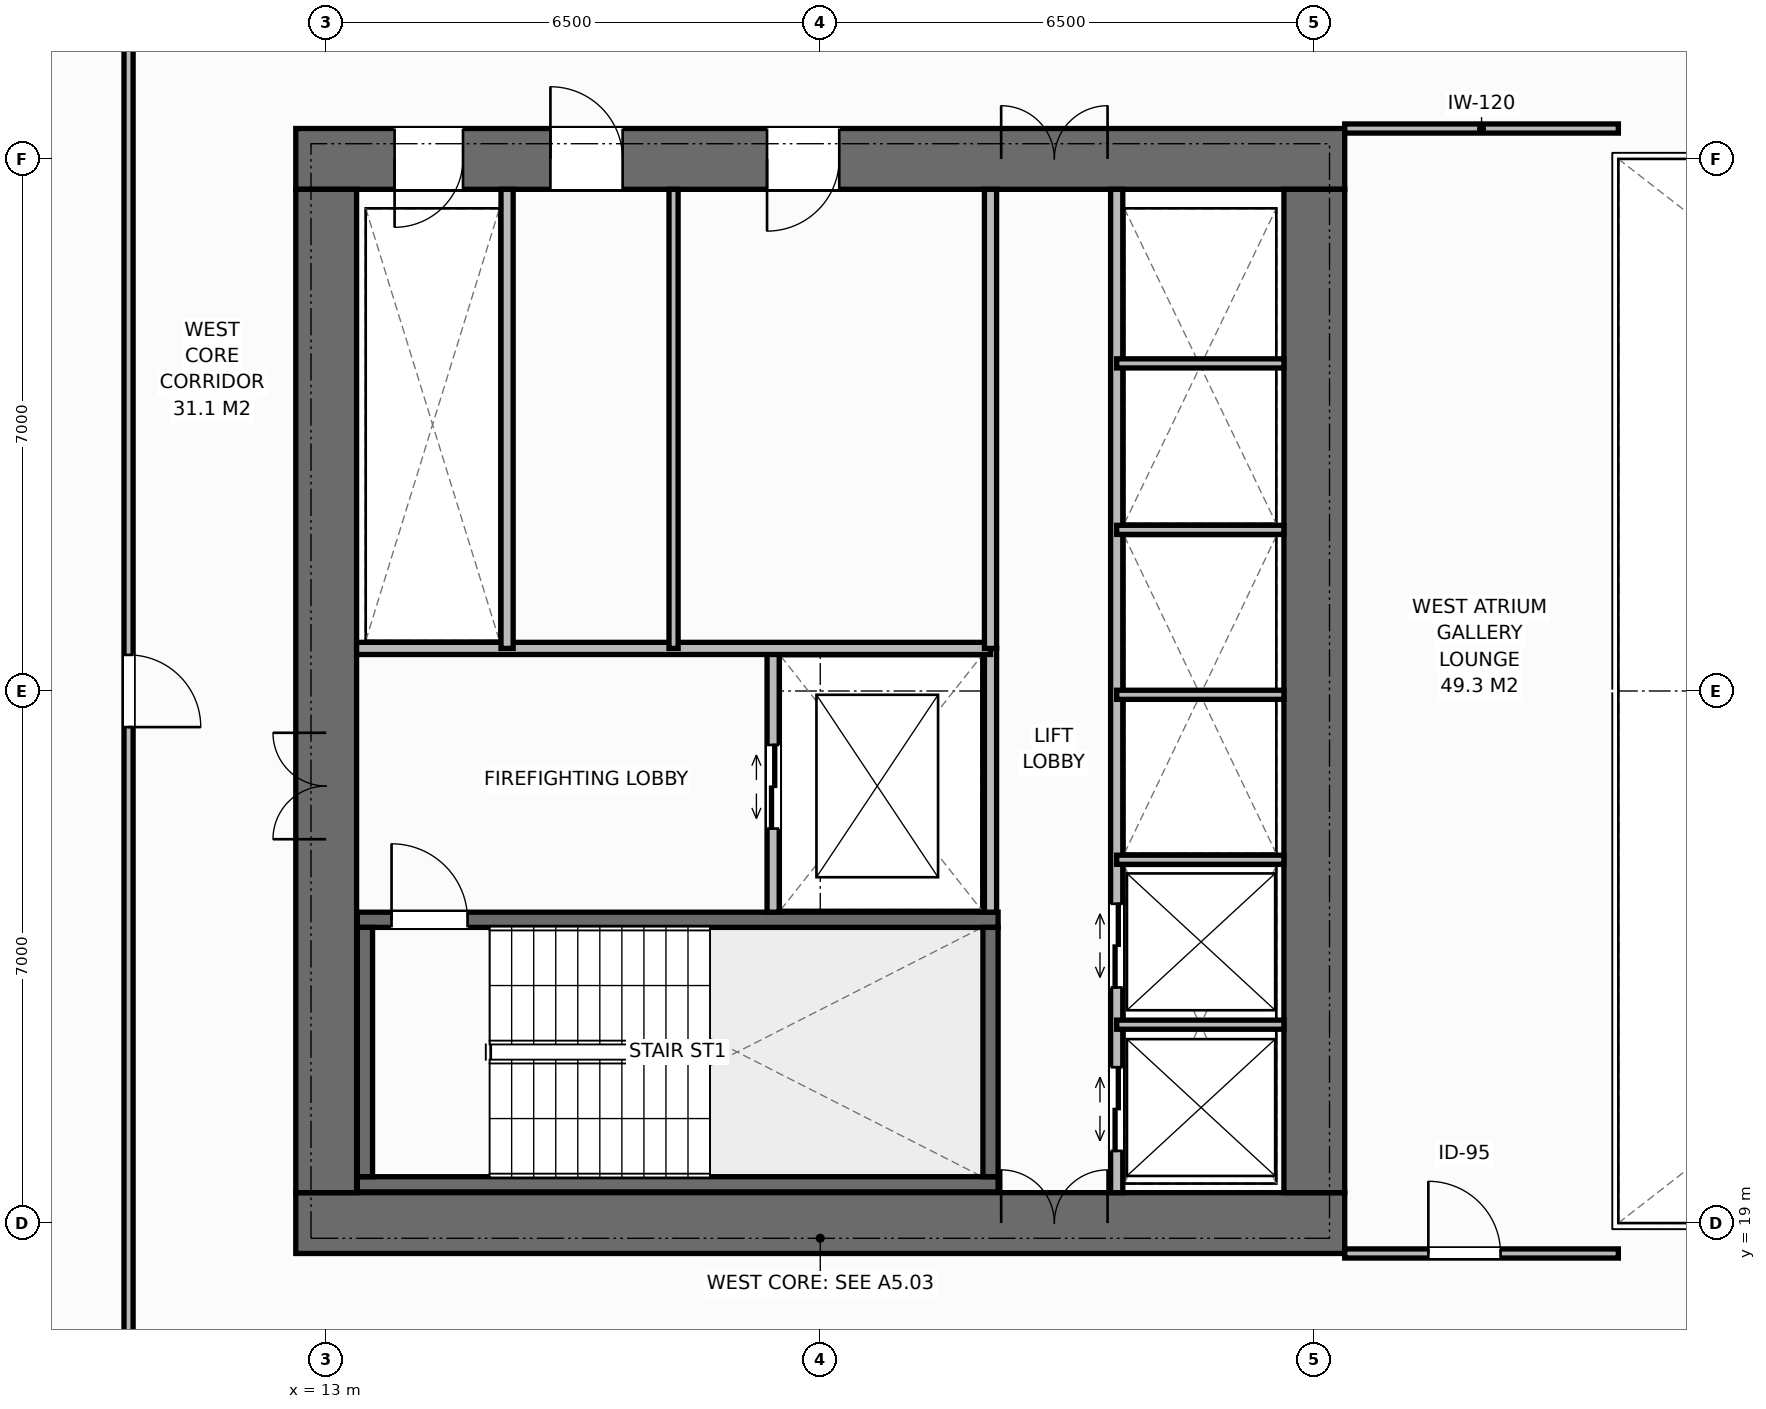
"""IFC4 building model, lengths in metres.
Left out: names, types, materials, properties, quantities, classifications, styles, units other than length and angle.
Written with IfcOpenShell. Run it as: python <this file> out.ifc"""

import sys

from ifc_helpers import new_model, si_unit, direction, frame, frame_2d, origin, place, context, subcontext, project, spatial, rectangle, extrude, element, fill, save


model = new_model("IFC4")
c1 = context("Model", 3, precision=1e-05, world=origin(), true_north=direction((0.0, 1.0)))
c2 = subcontext(c1, "Body", "Model", "MODEL_VIEW")
j1 = project(units=[si_unit("LENGTHUNIT", "METRE"), si_unit("PLANEANGLEUNIT", "RADIAN")], contexts=[c1])
p1 = place(None, origin())
s1 = spatial("IfcSite", under=j1, at=p1, CompositionType="ELEMENT")
p2 = place(p1, origin())
s2 = spatial("IfcBuilding", under=s1, at=p2, CompositionType="ELEMENT")
p3 = place(p2, frame((0.0, 0.0, 31.6)))
s3 = spatial("IfcBuildingStorey", under=s2, at=p3, CompositionType="ELEMENT", Elevation=31.6)
p4 = place(p3, frame((12.6, 19.0, 0.0), z_axis=(0.0, 0.0, 1.0), x_axis=(1.0, 0.0, 0.0)))
e1 = element("IfcWall", 1, at=p4, inside=s3, PredefinedType="SHEAR", context=c2, shape_type="SweptSolid", body=[
    extrude(rectangle(XDim=13.8, YDim=0.8, at=frame_2d((6.9, 0.0))), origin(), (0.0, 0.0, 1.0), 3.8),
])
p5 = place(p4, frame((9.28, 0.0, 0.0)))
e2 = element("IfcOpeningElement", 2, at=p5, cuts=e1, PredefinedType="OPENING", context=c2, shape_type="SweptSolid", body=[
    extrude(rectangle(XDim=1.4, YDim=2.2, at=frame_2d((0.7, 1.1))), frame((0.0, 0.41, 0.0), z_axis=(0.0, -1.0, 0.0), x_axis=(1.0, 0.0, 0.0)), (0.0, 0.0, 1.0), 0.82),
])
p6 = place(p3, frame((12.6, 33.0, 0.0), z_axis=(0.0, 0.0, 1.0), x_axis=(1.0, 0.0, 0.0)))
e3 = element("IfcWall", 3, at=p6, inside=s3, PredefinedType="SHEAR", context=c2, shape_type="SweptSolid", body=[
    extrude(rectangle(XDim=13.8, YDim=0.8, at=frame_2d((6.9, 0.0))), origin(), (0.0, 0.0, 1.0), 3.8),
])
p7 = place(p6, frame((1.3, 0.0, 0.0)))
e4 = element("IfcOpeningElement", 4, at=p7, cuts=e3, PredefinedType="OPENING", context=c2, shape_type="SweptSolid", body=[
    extrude(rectangle(XDim=0.9, YDim=2.15, at=frame_2d((0.45, 1.075))), frame((0.0, 0.41, 0.0), z_axis=(0.0, -1.0, 0.0), x_axis=(1.0, 0.0, 0.0)), (0.0, 0.0, 1.0), 0.82),
])
p8 = place(p6, frame((3.35, 0.0, 0.0)))
e5 = element("IfcOpeningElement", 5, at=p8, cuts=e3, PredefinedType="OPENING", context=c2, shape_type="SweptSolid", body=[
    extrude(rectangle(XDim=0.95, YDim=2.15, at=frame_2d((0.475, 1.075))), frame((0.0, 0.41, 0.0), z_axis=(0.0, -1.0, 0.0), x_axis=(1.0, 0.0, 0.0)), (0.0, 0.0, 1.0), 0.82),
])
p9 = place(p6, frame((6.2, 0.0, 0.0)))
e6 = element("IfcOpeningElement", 6, at=p9, cuts=e3, PredefinedType="OPENING", context=c2, shape_type="SweptSolid", body=[
    extrude(rectangle(XDim=0.95, YDim=2.15, at=frame_2d((0.475, 1.075))), frame((0.0, 0.41, 0.0), z_axis=(0.0, -1.0, 0.0), x_axis=(1.0, 0.0, 0.0)), (0.0, 0.0, 1.0), 0.82),
])
p10 = place(p6, frame((9.28, 0.0, 0.0)))
e7 = element("IfcOpeningElement", 7, at=p10, cuts=e3, PredefinedType="OPENING", context=c2, shape_type="SweptSolid", body=[
    extrude(rectangle(XDim=1.4, YDim=2.2, at=frame_2d((0.7, 1.1))), frame((0.0, 0.41, 0.0), z_axis=(0.0, -1.0, 0.0), x_axis=(1.0, 0.0, 0.0)), (0.0, 0.0, 1.0), 0.82),
])
p11 = place(p3, frame((13.0, 19.4, 0.0), z_axis=(0.0, 0.0, 1.0), x_axis=(0.0, 1.0, 0.0)))
e8 = element("IfcWall", 8, at=p11, inside=s3, PredefinedType="SHEAR", context=c2, shape_type="SweptSolid", body=[
    extrude(rectangle(XDim=13.2, YDim=0.8, at=frame_2d((6.6, 0.0))), origin(), (0.0, 0.0, 1.0), 3.8),
])
p12 = place(p11, frame((4.65, 0.0, 0.0)))
e9 = element("IfcOpeningElement", 9, at=p12, cuts=e8, PredefinedType="OPENING", context=c2, shape_type="SweptSolid", body=[
    extrude(rectangle(XDim=1.4, YDim=2.2, at=frame_2d((0.7, 1.1))), frame((0.0, 0.41, 0.0), z_axis=(0.0, -1.0, 0.0), x_axis=(1.0, 0.0, 0.0)), (0.0, 0.0, 1.0), 0.82),
])
p13 = place(p3, frame((26.0, 19.4, 0.0), z_axis=(0.0, 0.0, 1.0), x_axis=(0.0, 1.0, 0.0)))
e10 = element("IfcWall", 10, at=p13, inside=s3, PredefinedType="SHEAR", context=c2, shape_type="SweptSolid", body=[
    extrude(rectangle(XDim=13.2, YDim=0.8, at=frame_2d((6.6, 0.0))), origin(), (0.0, 0.0, 1.0), 3.8),
])
p14 = place(p3, frame((13.41, 19.51, 0.0), z_axis=(0.0, 0.0, 1.0), x_axis=(1.0, 0.0, 0.0)))
e11 = element("IfcWall", 11, at=p14, inside=s3, PredefinedType="SHEAR", context=c2, shape_type="SweptSolid", body=[
    extrude(rectangle(XDim=8.43, YDim=0.2, at=frame_2d((4.215, 0.0))), origin(), (0.0, 0.0, 1.0), 3.8),
])
p15 = place(p3, frame((13.41, 22.99, 0.0), z_axis=(0.0, 0.0, 1.0), x_axis=(1.0, 0.0, 0.0)))
e12 = element("IfcWall", 12, at=p15, inside=s3, PredefinedType="SHEAR", context=c2, shape_type="SweptSolid", body=[
    extrude(rectangle(XDim=8.43, YDim=0.2, at=frame_2d((4.215, 0.0))), origin(), (0.0, 0.0, 1.0), 3.8),
])
p16 = place(p15, frame((0.45, 0.0, 0.0)))
e13 = element("IfcOpeningElement", 13, at=p16, cuts=e12, PredefinedType="OPENING", context=c2, shape_type="SweptSolid", body=[
    extrude(rectangle(XDim=1.0, YDim=2.15, at=frame_2d((0.5, 1.075))), frame((0.0, 0.11, 0.0), z_axis=(0.0, -1.0, 0.0), x_axis=(1.0, 0.0, 0.0)), (0.0, 0.0, 1.0), 0.22),
])
for number, where, z_axis, x_axis in (
    (14, (13.51, 19.61, 0.0), (0.0, 0.0, 1.0), (0.0, 1.0, 0.0)),
    (15, (21.74, 19.61, 0.0), (0.0, 0.0, 1.0), (0.0, 1.0, 0.0)),
):
    element("IfcWall", number, at=place(p3, frame(where, z_axis=z_axis, x_axis=x_axis)), inside=s3, PredefinedType="SHEAR", context=c2, shape_type="SweptSolid", body=[
        extrude(rectangle(XDim=3.28, YDim=0.2, at=frame_2d((1.64, 0.0))), origin(), (0.0, 0.0, 1.0), 3.8),
    ])
p17 = place(p3, frame((21.74, 23.09, 0.0), z_axis=(0.0, 0.0, 1.0), x_axis=(0.0, 1.0, 0.0)))
e16 = element("IfcWall", 16, at=p17, inside=s3, PredefinedType="STANDARD", context=c2, shape_type="SweptSolid", body=[
    extrude(rectangle(XDim=3.47, YDim=0.16, at=frame_2d((1.735, 0.0))), origin(), (0.0, 0.0, 1.0), 3.55),
])
p18 = place(p3, frame((18.88, 23.09, 0.0), z_axis=(0.0, 0.0, 1.0), x_axis=(0.0, 1.0, 0.0)))
e17 = element("IfcWall", 17, at=p18, inside=s3, PredefinedType="STANDARD", context=c2, shape_type="SweptSolid", body=[
    extrude(rectangle(XDim=3.47, YDim=0.16, at=frame_2d((1.735, 0.0))), origin(), (0.0, 0.0, 1.0), 3.55),
])
p19 = place(p18, frame((1.1, 0.0, 0.0)))
e18 = element("IfcOpeningElement", 18, at=p19, cuts=e17, PredefinedType="OPENING", context=c2, shape_type="SweptSolid", body=[
    extrude(rectangle(XDim=1.1, YDim=2.2, at=frame_2d((0.55, 1.1))), frame((0.0, 0.09, 0.0), z_axis=(0.0, -1.0, 0.0), x_axis=(1.0, 0.0, 0.0)), (0.0, 0.0, 1.0), 0.18),
])
p20 = place(p3, frame((13.4, 26.56, 0.0), z_axis=(0.0, 0.0, 1.0), x_axis=(1.0, 0.0, 0.0)))
e19 = element("IfcWall", 19, at=p20, inside=s3, PredefinedType="STANDARD", context=c2, shape_type="SweptSolid", body=[
    extrude(rectangle(XDim=8.34, YDim=0.16, at=frame_2d((4.17, 0.0))), origin(), (0.0, 0.0, 1.0), 3.55),
])
p21 = place(p3, frame((15.38, 26.56, 0.0), z_axis=(0.0, 0.0, 1.0), x_axis=(0.0, 1.0, 0.0)))
e20 = element("IfcWall", 20, at=p21, inside=s3, PredefinedType="STANDARD", context=c2, shape_type="SweptSolid", body=[
    extrude(rectangle(XDim=6.04, YDim=0.16, at=frame_2d((3.02, 0.0))), origin(), (0.0, 0.0, 1.0), 3.55),
])
p22 = place(p3, frame((17.57, 26.56, 0.0), z_axis=(0.0, 0.0, 1.0), x_axis=(0.0, 1.0, 0.0)))
e21 = element("IfcWall", 21, at=p22, inside=s3, PredefinedType="PARTITIONING", context=c2, shape_type="SweptSolid", body=[
    extrude(rectangle(XDim=6.04, YDim=0.12, at=frame_2d((3.02, 0.0))), origin(), (0.0, 0.0, 1.0), 3.55),
])
p23 = place(p3, frame((21.74, 26.56, 0.0), z_axis=(0.0, 0.0, 1.0), x_axis=(0.0, 1.0, 0.0)))
e22 = element("IfcWall", 22, at=p23, inside=s3, PredefinedType="STANDARD", context=c2, shape_type="SweptSolid", body=[
    extrude(rectangle(XDim=6.04, YDim=0.16, at=frame_2d((3.02, 0.0))), origin(), (0.0, 0.0, 1.0), 3.55),
])
p24 = place(p3, frame((23.4, 19.4, 0.0), z_axis=(0.0, 0.0, 1.0), x_axis=(0.0, 1.0, 0.0)))
e23 = element("IfcWall", 23, at=p24, inside=s3, PredefinedType="STANDARD", context=c2, shape_type="SweptSolid", body=[
    extrude(rectangle(XDim=13.2, YDim=0.16, at=frame_2d((6.6, 0.0))), origin(), (0.0, 0.0, 1.0), 3.55),
])
p25 = place(p24, frame((0.55, 0.0, 0.0)))
e24 = element("IfcOpeningElement", 24, at=p25, cuts=e23, PredefinedType="OPENING", context=c2, shape_type="SweptSolid", body=[
    extrude(rectangle(XDim=1.1, YDim=2.2, at=frame_2d((0.55, 1.1))), frame((0.0, 0.09, 0.0), z_axis=(0.0, -1.0, 0.0), x_axis=(1.0, 0.0, 0.0)), (0.0, 0.0, 1.0), 0.18),
])
p26 = place(p24, frame((2.7, 0.0, 0.0)))
e25 = element("IfcOpeningElement", 25, at=p26, cuts=e23, PredefinedType="OPENING", context=c2, shape_type="SweptSolid", body=[
    extrude(rectangle(XDim=1.1, YDim=2.2, at=frame_2d((0.55, 1.1))), frame((0.0, 0.09, 0.0), z_axis=(0.0, -1.0, 0.0), x_axis=(1.0, 0.0, 0.0)), (0.0, 0.0, 1.0), 0.18),
])
for number, where, z_axis, x_axis in (
    (26, (23.4, 21.61, 0.0), (0.0, 0.0, 1.0), (1.0, 0.0, 0.0)),
    (27, (23.4, 23.78, 0.0), (0.0, 0.0, 1.0), (1.0, 0.0, 0.0)),
    (28, (23.4, 25.95, 0.0), (0.0, 0.0, 1.0), (1.0, 0.0, 0.0)),
    (29, (23.4, 28.12, 0.0), (0.0, 0.0, 1.0), (1.0, 0.0, 0.0)),
    (30, (23.4, 30.31, 0.0), (0.0, 0.0, 1.0), (1.0, 0.0, 0.0)),
):
    element("IfcWall", number, at=place(p3, frame(where, z_axis=z_axis, x_axis=x_axis)), inside=s3, PredefinedType="PARTITIONING", context=c2, shape_type="SweptSolid", body=[
        extrude(rectangle(XDim=2.2, YDim=0.12, at=frame_2d((1.1, 0.0))), origin(), (0.0, 0.0, 1.0), 3.55),
    ])
p27 = place(p3, frame((26.4, 33.4, 0.0), z_axis=(0.0, 0.0, 1.0), x_axis=(1.0, 0.0, 0.0)))
e31 = element("IfcWall", 31, at=p27, inside=s3, PredefinedType="PARTITIONING", context=c2, shape_type="SweptSolid", body=[
    extrude(rectangle(XDim=3.6, YDim=0.12, at=frame_2d((1.8, 0.0))), origin(), (0.0, 0.0, 1.0), 3.55),
])
p28 = place(p3, frame((26.4, 18.6, 0.0), z_axis=(0.0, 0.0, 1.0), x_axis=(1.0, 0.0, 0.0)))
e32 = element("IfcWall", 32, at=p28, inside=s3, PredefinedType="PARTITIONING", context=c2, shape_type="SweptSolid", body=[
    extrude(rectangle(XDim=3.6, YDim=0.12, at=frame_2d((1.8, 0.0))), origin(), (0.0, 0.0, 1.0), 3.55),
])
p29 = place(p28, frame((1.1, 0.0, 0.0)))
e33 = element("IfcOpeningElement", 33, at=p29, cuts=e32, PredefinedType="OPENING", context=c2, shape_type="SweptSolid", body=[
    extrude(rectangle(XDim=0.95, YDim=2.15, at=frame_2d((0.475, 1.075))), frame((0.0, 0.07, 0.0), z_axis=(0.0, -1.0, 0.0), x_axis=(1.0, 0.0, 0.0)), (0.0, 0.0, 1.0), 0.14),
])
p30 = place(p3, frame((10.4, 16.5, 0.0), z_axis=(0.0, 0.0, 1.0), x_axis=(0.0, 1.0, 0.0)))
e34 = element("IfcWall", 34, at=p30, inside=s3, PredefinedType="PARTITIONING", context=c2, shape_type="SweptSolid", body=[
    extrude(rectangle(XDim=19.0, YDim=0.12, at=frame_2d((9.5, 0.0))), origin(), (0.0, 0.0, 1.0), 3.55),
])
p31 = place(p30, frame((9.025, 0.0, 0.0)))
e35 = element("IfcOpeningElement", 35, at=p31, cuts=e34, PredefinedType="OPENING", context=c2, shape_type="SweptSolid", body=[
    extrude(rectangle(XDim=0.95, YDim=2.15, at=frame_2d((0.475, 1.075))), frame((0.0, 0.07, 0.0), z_axis=(0.0, -1.0, 0.0), x_axis=(1.0, 0.0, 0.0)), (0.0, 0.0, 1.0), 0.14),
])
p32 = place(p16, origin())
e36 = element("IfcDoor", 36, at=p32, inside=s3, OperationType="SINGLE_SWING_LEFT", PredefinedType="DOOR", context=c2, shape_type="SweptSolid", body=[
    extrude(rectangle(XDim=1.0, YDim=2.15, at=frame_2d((0.5, 1.075))), frame((0.0, 0.025, 0.0), z_axis=(0.0, -1.0, 0.0), x_axis=(1.0, 0.0, 0.0)), (0.0, 0.0, 1.0), 0.05),
])
fill(e13, e36)
p33 = place(p12, origin())
e37 = element("IfcDoor", 37, at=p33, inside=s3, OperationType="DOUBLE_DOOR_SINGLE_SWING", PredefinedType="DOOR", context=c2, shape_type="SweptSolid", body=[
    extrude(rectangle(XDim=1.4, YDim=2.2, at=frame_2d((0.7, 1.1))), frame((0.0, 0.025, 0.0), z_axis=(0.0, -1.0, 0.0), x_axis=(1.0, 0.0, 0.0)), (0.0, 0.0, 1.0), 0.05),
])
fill(e9, e37)
p34 = place(p19, origin())
e38 = element("IfcDoor", 38, at=p34, inside=s3, OperationType="DOUBLE_DOOR_SLIDING", PredefinedType="DOOR", context=c2, shape_type="SweptSolid", body=[
    extrude(rectangle(XDim=1.1, YDim=2.2, at=frame_2d((0.55, 1.1))), frame((0.0, 0.025, 0.0), z_axis=(0.0, -1.0, 0.0), x_axis=(1.0, 0.0, 0.0)), (0.0, 0.0, 1.0), 0.05),
])
fill(e18, e38)
p35 = place(p7, origin())
e39 = element("IfcDoor", 39, at=p35, inside=s3, OperationType="SINGLE_SWING_RIGHT", PredefinedType="DOOR", context=c2, shape_type="SweptSolid", body=[
    extrude(rectangle(XDim=0.9, YDim=2.15, at=frame_2d((0.45, 1.075))), frame((0.0, -0.075, 0.0), z_axis=(0.0, -1.0, 0.0), x_axis=(1.0, 0.0, 0.0)), (0.0, 0.0, 1.0), 0.05),
])
fill(e4, e39)
p36 = place(p8, origin())
e40 = element("IfcDoor", 40, at=p36, inside=s3, OperationType="SINGLE_SWING_LEFT", PredefinedType="DOOR", context=c2, shape_type="SweptSolid", body=[
    extrude(rectangle(XDim=0.95, YDim=2.15, at=frame_2d((0.475, 1.075))), frame((0.0, -0.075, 0.0), z_axis=(0.0, -1.0, 0.0), x_axis=(1.0, 0.0, 0.0)), (0.0, 0.0, 1.0), 0.05),
])
fill(e5, e40)
p37 = place(p9, origin())
e41 = element("IfcDoor", 41, at=p37, inside=s3, OperationType="SINGLE_SWING_RIGHT", PredefinedType="DOOR", context=c2, shape_type="SweptSolid", body=[
    extrude(rectangle(XDim=0.95, YDim=2.15, at=frame_2d((0.475, 1.075))), frame((0.0, -0.075, 0.0), z_axis=(0.0, -1.0, 0.0), x_axis=(1.0, 0.0, 0.0)), (0.0, 0.0, 1.0), 0.05),
])
fill(e6, e41)
p38 = place(p5, origin())
e42 = element("IfcDoor", 42, at=p38, inside=s3, OperationType="DOUBLE_DOOR_SINGLE_SWING", PredefinedType="DOOR", context=c2, shape_type="SweptSolid", body=[
    extrude(rectangle(XDim=1.4, YDim=2.2, at=frame_2d((0.7, 1.1))), frame((0.0, 0.125, 0.0), z_axis=(0.0, -1.0, 0.0), x_axis=(1.0, 0.0, 0.0)), (0.0, 0.0, 1.0), 0.05),
])
fill(e2, e42)
p39 = place(p10, origin())
e43 = element("IfcDoor", 43, at=p39, inside=s3, OperationType="DOUBLE_DOOR_SINGLE_SWING", PredefinedType="DOOR", context=c2, shape_type="SweptSolid", body=[
    extrude(rectangle(XDim=1.4, YDim=2.2, at=frame_2d((0.7, 1.1))), frame((0.0, -0.075, 0.0), z_axis=(0.0, -1.0, 0.0), x_axis=(1.0, 0.0, 0.0)), (0.0, 0.0, 1.0), 0.05),
])
fill(e7, e43)
p40 = place(p25, origin())
e44 = element("IfcDoor", 44, at=p40, inside=s3, OperationType="DOUBLE_DOOR_SLIDING", PredefinedType="DOOR", context=c2, shape_type="SweptSolid", body=[
    extrude(rectangle(XDim=1.1, YDim=2.2, at=frame_2d((0.55, 1.1))), frame((0.0, 0.025, 0.0), z_axis=(0.0, -1.0, 0.0), x_axis=(1.0, 0.0, 0.0)), (0.0, 0.0, 1.0), 0.05),
])
fill(e24, e44)
p41 = place(p26, origin())
e45 = element("IfcDoor", 45, at=p41, inside=s3, OperationType="DOUBLE_DOOR_SLIDING", PredefinedType="DOOR", context=c2, shape_type="SweptSolid", body=[
    extrude(rectangle(XDim=1.1, YDim=2.2, at=frame_2d((0.55, 1.1))), frame((0.0, 0.025, 0.0), z_axis=(0.0, -1.0, 0.0), x_axis=(1.0, 0.0, 0.0)), (0.0, 0.0, 1.0), 0.05),
])
fill(e25, e45)
p42 = place(p29, origin())
e46 = element("IfcDoor", 46, at=p42, inside=s3, OperationType="SINGLE_SWING_LEFT", PredefinedType="DOOR", context=c2, shape_type="SweptSolid", body=[
    extrude(rectangle(XDim=0.95, YDim=2.15, at=frame_2d((0.475, 1.075))), frame((0.0, 0.025, 0.0), z_axis=(0.0, -1.0, 0.0), x_axis=(1.0, 0.0, 0.0)), (0.0, 0.0, 1.0), 0.05),
])
fill(e33, e46)
p43 = place(p31, origin())
e47 = element("IfcDoor", 47, at=p43, inside=s3, OperationType="SINGLE_SWING_RIGHT", PredefinedType="DOOR", context=c2, shape_type="SweptSolid", body=[
    extrude(rectangle(XDim=0.95, YDim=2.15, at=frame_2d((0.475, 1.075))), frame((0.0, 0.025, 0.0), z_axis=(0.0, -1.0, 0.0), x_axis=(1.0, 0.0, 0.0)), (0.0, 0.0, 1.0), 0.05),
])
fill(e35, e47)
save(model, sys.argv[1])
